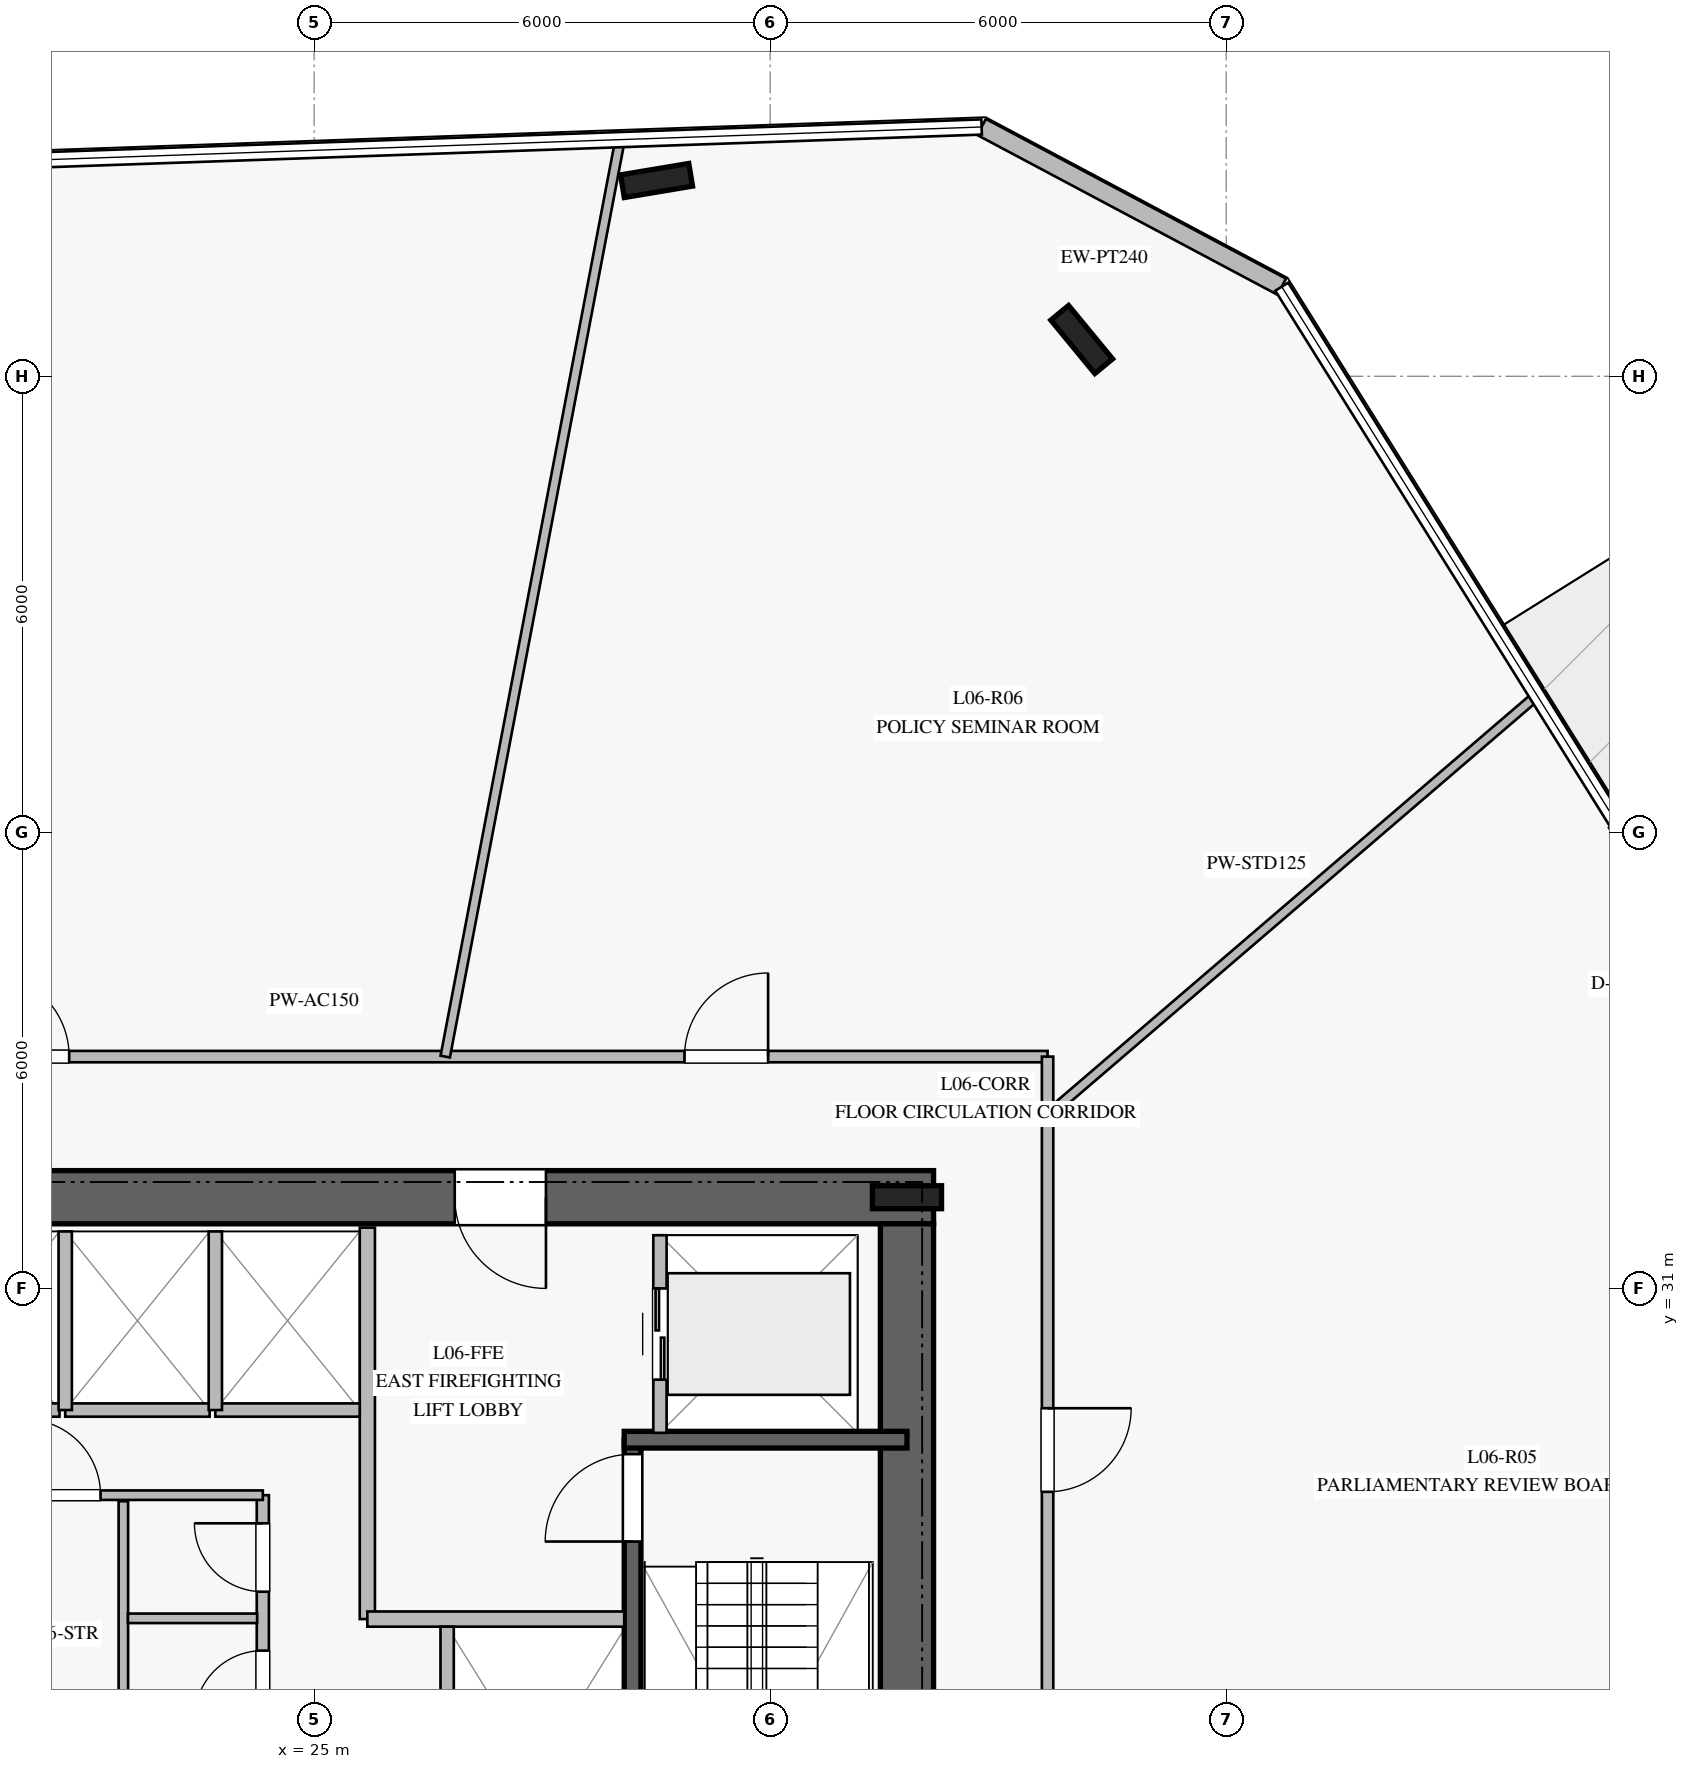
"""IFC4 building model, lengths in metres.
Left out: names, types, materials, properties, quantities, classifications, styles, units other than length and angle.
Written with IfcOpenShell. Run it as: python <this file> out.ifc"""

import sys

from ifc_helpers import new_model, si_unit, direction, frame, frame_2d, origin, origin_2d, place, context, subcontext, project, spatial, rectangle, i_section, extrude, element, fill, save


model = new_model("IFC4")
c1 = context("Model", 3, precision=1e-05, world=origin(), true_north=direction((0.0, 1.0)))
c2 = subcontext(c1, "Body", "Model", "MODEL_VIEW")
j1 = project(units=[si_unit("LENGTHUNIT", "METRE"), si_unit("PLANEANGLEUNIT", "RADIAN")], contexts=[c1])
p1 = place(None, origin())
s1 = spatial("IfcSite", under=j1, at=p1, CompositionType="ELEMENT")
p2 = place(p1, origin())
s2 = spatial("IfcBuilding", under=s1, at=p2, CompositionType="ELEMENT")
p3 = place(p2, frame((0.0, 0.0, 28.0)))
s3 = spatial("IfcBuildingStorey", under=s2, at=p3, CompositionType="ELEMENT", Elevation=28.0)
p4 = place(p3, frame((33.15, 32.2, 0.0), z_axis=(0.0, 0.0, 1.0), x_axis=(-1.0, 0.0, 0.0)))
e1 = element("IfcWall", 1, at=p4, inside=s3, PredefinedType="SHEAR", context=c2, shape_type="SweptSolid", body=[
    extrude(rectangle(XDim=16.3, YDim=0.7, at=frame_2d((8.15, 0.0))), origin(), (0.0, 0.0, 1.0), 3.76),
])
p5 = place(p4, frame((5.1, 0.0, 0.0)))
e2 = element("IfcOpeningElement", 2, at=p5, cuts=e1, PredefinedType="OPENING", context=c2, shape_type="SweptSolid", body=[
    extrude(rectangle(XDim=1.2, YDim=2.25, at=frame_2d((0.6, 1.125))), frame((0.0, 0.36, 0.0), z_axis=(0.0, -1.0, 0.0), x_axis=(1.0, 0.0, 0.0)), (0.0, 0.0, 1.0), 0.72),
])
p6 = place(p3, frame((32.8, 18.15, 0.0), z_axis=(0.0, 0.0, 1.0), x_axis=(0.0, 1.0, 0.0)))
e3 = element("IfcWall", 3, at=p6, inside=s3, PredefinedType="SHEAR", context=c2, shape_type="SweptSolid", body=[
    extrude(rectangle(XDim=13.7, YDim=0.7, at=frame_2d((6.85, 0.0))), origin(), (0.0, 0.0, 1.0), 3.76),
])
p7 = place(p3, frame((32.8, 32.2, 0.0), z_axis=(0.0, 0.0, 1.0), x_axis=(1.0, 0.0, 0.0)))
e4 = element("IfcColumn", 4, at=p7, inside=s3, PredefinedType="COLUMN", context=c2, shape_type="SweptSolid", body=[
    extrude(i_section(OverallWidth=0.302, OverallDepth=0.91, WebThickness=0.021, FlangeThickness=0.04, at=origin_2d()), origin(), (0.0, 0.0, 1.0), 4.0),
])
p8 = place(p3, frame((29.19, 21.79, 0.0), z_axis=(0.0, 0.0, 1.0), x_axis=(0.0, 1.0, 0.0)))
e5 = element("IfcWall", 5, at=p8, inside=s3, PredefinedType="SOLIDWALL", context=c2, shape_type="SweptSolid", body=[
    extrude(rectangle(XDim=7.22, YDim=0.22, at=frame_2d((3.61, 0.0))), origin(), (0.0, 0.0, 1.0), 3.76),
])
p9 = place(p8, frame((5.88, 0.0, 0.0)))
e6 = element("IfcOpeningElement", 6, at=p9, cuts=e5, PredefinedType="OPENING", context=c2, shape_type="SweptSolid", body=[
    extrude(rectangle(XDim=1.15, YDim=2.2, at=frame_2d((0.575, 1.1))), frame((0.0, 0.12, 0.0), z_axis=(0.0, -1.0, 0.0), x_axis=(1.0, 0.0, 0.0)), (0.0, 0.0, 1.0), 0.24),
])
p10 = place(p3, frame((29.08, 29.01, 0.0), z_axis=(0.0, 0.0, 1.0), x_axis=(1.0, 0.0, 0.0)))
e7 = element("IfcWall", 7, at=p10, inside=s3, PredefinedType="SOLIDWALL", context=c2, shape_type="SweptSolid", body=[
    extrude(rectangle(XDim=3.72, YDim=0.22, at=frame_2d((1.86, 0.0))), origin(), (0.0, 0.0, 1.0), 3.76),
])
for number, where, z_axis, x_axis in (
    (8, (35.099, 43.484, 0.0), (0.0, 0.0, 1.0), (-0.636, 0.772, 0.0)),
    (9, (29.505, 45.576, 0.0), (0.0, 0.0, 1.0), (0.986, 0.165, 0.0)),
):
    element("IfcColumn", number, at=place(p3, frame(where, z_axis=z_axis, x_axis=x_axis)), inside=s3, PredefinedType="COLUMN", context=c2, shape_type="SweptSolid", body=[
        extrude(i_section(OverallWidth=0.302, OverallDepth=0.91, WebThickness=0.021, FlangeThickness=0.04, at=origin_2d()), origin(), (0.0, 0.0, 1.0), 4.0),
    ])
p11 = place(p3, frame((43.411, 35.089, 0.0), z_axis=(0.0, 0.0, 1.0), x_axis=(-0.530044663287, 0.847969725239, 0.0)))
e10 = element("IfcWall", 10, at=p11, inside=s3, PredefinedType="STANDARD", context=c2, shape_type="SweptSolid", body=[
    extrude(rectangle(XDim=2.4, YDim=0.24, at=frame_2d((1.2, 0.0))), origin(), (0.0, 0.0, 1.0), 3.76),
])
p12 = place(p11, frame((0.4, 0.0, 0.0)))
e11 = element("IfcOpeningElement", 11, at=p12, cuts=e10, PredefinedType="OPENING", context=c2, shape_type="SweptSolid", body=[
    extrude(rectangle(XDim=1.6, YDim=2.25, at=frame_2d((0.8, 1.125))), frame((0.0, 0.13, 0.0), z_axis=(0.0, -1.0, 0.0), x_axis=(1.0, 0.0, 0.0)), (0.0, 0.0, 1.0), 0.26),
])
p13 = place(p3, frame((37.731, 44.179, 0.0), z_axis=(0.0, 0.0, 1.0), x_axis=(-0.882820866688, 0.469709822486, 0.0)))
e12 = element("IfcWall", 12, at=p13, inside=s3, PredefinedType="STANDARD", context=c2, shape_type="SweptSolid", body=[
    extrude(rectangle(XDim=4.473, YDim=0.24, at=frame_2d((2.237, 0.0))), origin(), (0.0, 0.0, 1.0), 3.76),
])
p14 = place(p3, frame((25.7, 26.65, 0.0), z_axis=(0.0, 0.0, 1.0), x_axis=(0.0, 1.0, 0.0)))
e13 = element("IfcWall", 13, at=p14, inside=s3, PredefinedType="PARTITIONING", context=c2, shape_type="SweptSolid", body=[
    extrude(rectangle(XDim=5.15, YDim=0.2, at=frame_2d((2.575, 0.0))), origin(), (0.0, 0.0, 1.0), 3.76),
])
p15 = place(p3, frame((25.7, 26.65, 0.0), z_axis=(0.0, 0.0, 1.0), x_axis=(1.0, 0.0, 0.0)))
e14 = element("IfcWall", 14, at=p15, inside=s3, PredefinedType="PARTITIONING", context=c2, shape_type="SweptSolid", body=[
    extrude(rectangle(XDim=3.38, YDim=0.2, at=frame_2d((1.69, 0.0))), origin(), (0.0, 0.0, 1.0), 3.76),
])
p16 = place(p3, frame((24.325, 23.35, 0.0), z_axis=(0.0, 0.0, 1.0), x_axis=(0.0, 1.0, 0.0)))
e15 = element("IfcWall", 15, at=p16, inside=s3, PredefinedType="PLUMBINGWALL", context=c2, shape_type="SweptSolid", body=[
    extrude(rectangle(XDim=4.93, YDim=0.16, at=frame_2d((2.465, 0.0))), origin(), (0.0, 0.0, 1.0), 3.76),
])
p17 = place(p16, frame((0.325, 0.0, 0.0)))
e16 = element("IfcOpeningElement", 16, at=p17, cuts=e15, PredefinedType="OPENING", context=c2, shape_type="SweptSolid", body=[
    extrude(rectangle(XDim=0.95, YDim=2.1, at=frame_2d((0.475, 1.05))), frame((0.0, 0.09, 0.0), z_axis=(0.0, -1.0, 0.0), x_axis=(1.0, 0.0, 0.0)), (0.0, 0.0, 1.0), 0.18),
])
p18 = place(p16, frame((1.985, 0.0, 0.0)))
e17 = element("IfcOpeningElement", 17, at=p18, cuts=e15, PredefinedType="OPENING", context=c2, shape_type="SweptSolid", body=[
    extrude(rectangle(XDim=0.9, YDim=2.1, at=frame_2d((0.45, 1.05))), frame((0.0, 0.09, 0.0), z_axis=(0.0, -1.0, 0.0), x_axis=(1.0, 0.0, 0.0)), (0.0, 0.0, 1.0), 0.18),
])
p19 = place(p16, frame((3.66, 0.0, 0.0)))
e18 = element("IfcOpeningElement", 18, at=p19, cuts=e15, PredefinedType="OPENING", context=c2, shape_type="SweptSolid", body=[
    extrude(rectangle(XDim=0.9, YDim=2.1, at=frame_2d((0.45, 1.05))), frame((0.0, 0.09, 0.0), z_axis=(0.0, -1.0, 0.0), x_axis=(1.0, 0.0, 0.0)), (0.0, 0.0, 1.0), 0.18),
])
p20 = place(p3, frame((20.92, 28.28, 0.0), z_axis=(0.0, 0.0, 1.0), x_axis=(1.0, 0.0, 0.0)))
e19 = element("IfcWall", 19, at=p20, inside=s3, PredefinedType="PARTITIONING", context=c2, shape_type="SweptSolid", body=[
    extrude(rectangle(XDim=3.405, YDim=0.125, at=frame_2d((1.703, 0.0))), origin(), (0.0, 0.0, 1.0), 3.76),
])
p21 = place(p20, frame((0.27, 0.0, 0.0)))
e20 = element("IfcOpeningElement", 20, at=p21, cuts=e19, PredefinedType="OPENING", context=c2, shape_type="SweptSolid", body=[
    extrude(rectangle(XDim=1.0, YDim=2.15, at=frame_2d((0.5, 1.075))), frame((0.0, 0.073, 0.0), z_axis=(0.0, -1.0, 0.0), x_axis=(1.0, 0.0, 0.0)), (0.0, 0.0, 1.0), 0.145),
])
p22 = place(p3, frame((22.49, 24.97, 0.0), z_axis=(0.0, 0.0, 1.0), x_axis=(0.0, 1.0, 0.0)))
e21 = element("IfcWall", 21, at=p22, inside=s3, PredefinedType="PARTITIONING", context=c2, shape_type="SweptSolid", body=[
    extrude(rectangle(XDim=3.23, YDim=0.125, at=frame_2d((1.615, 0.0))), origin(), (0.0, 0.0, 1.0), 3.76),
])
p23 = place(p3, frame((22.55, 26.66, 0.0), z_axis=(0.0, 0.0, 1.0), x_axis=(1.0, 0.0, 0.0)))
e22 = element("IfcWall", 22, at=p23, inside=s3, PredefinedType="PARTITIONING", context=c2, shape_type="SweptSolid", body=[
    extrude(rectangle(XDim=1.7, YDim=0.125, at=frame_2d((0.85, 0.0))), origin(), (0.0, 0.0, 1.0), 3.76),
])
for number, where, z_axis, x_axis in (
    (23, (19.75, 29.4, 0.0), (0.0, 0.0, 1.0), (1.0, 0.0, 0.0)),
    (24, (21.725, 29.4, 0.0), (0.0, 0.0, 1.0), (1.0, 0.0, 0.0)),
):
    element("IfcWall", number, at=place(p3, frame(where, z_axis=z_axis, x_axis=x_axis)), inside=s3, PredefinedType="PARTITIONING", context=c2, shape_type="SweptSolid", body=[
        extrude(rectangle(XDim=1.9, YDim=0.175, at=frame_2d((0.95, 0.0))), origin(), (0.0, 0.0, 1.0), 3.76),
    ])
p24 = place(p3, frame((21.725, 29.4, 0.0), z_axis=(0.0, 0.0, 1.0), x_axis=(0.0, 1.0, 0.0)))
e25 = element("IfcWall", 25, at=p24, inside=s3, PredefinedType="PARTITIONING", context=c2, shape_type="SweptSolid", body=[
    extrude(rectangle(XDim=2.35, YDim=0.175, at=frame_2d((1.175, 0.0))), origin(), (0.0, 0.0, 1.0), 3.76),
])
p25 = place(p3, frame((23.7, 29.4, 0.0), z_axis=(0.0, 0.0, 1.0), x_axis=(1.0, 0.0, 0.0)))
e26 = element("IfcWall", 26, at=p25, inside=s3, PredefinedType="PARTITIONING", context=c2, shape_type="SweptSolid", body=[
    extrude(rectangle(XDim=1.9, YDim=0.175, at=frame_2d((0.95, 0.0))), origin(), (0.0, 0.0, 1.0), 3.76),
])
p26 = place(p3, frame((23.7, 29.4, 0.0), z_axis=(0.0, 0.0, 1.0), x_axis=(0.0, 1.0, 0.0)))
e27 = element("IfcWall", 27, at=p26, inside=s3, PredefinedType="PARTITIONING", context=c2, shape_type="SweptSolid", body=[
    extrude(rectangle(XDim=2.35, YDim=0.175, at=frame_2d((1.175, 0.0))), origin(), (0.0, 0.0, 1.0), 3.76),
])
p27 = place(p3, frame((26.75, 24.65, 0.0), z_axis=(0.0, 0.0, 1.0), x_axis=(0.0, 1.0, 0.0)))
e28 = element("IfcWall", 28, at=p27, inside=s3, PredefinedType="PARTITIONING", context=c2, shape_type="SweptSolid", body=[
    extrude(rectangle(XDim=1.9, YDim=0.175, at=frame_2d((0.95, 0.0))), origin(), (0.0, 0.0, 1.0), 3.76),
])
p28 = place(p3, frame((29.55, 29.1, 0.0), z_axis=(0.0, 0.0, 1.0), x_axis=(0.0, 1.0, 0.0)))
e29 = element("IfcWall", 29, at=p28, inside=s3, PredefinedType="PARTITIONING", context=c2, shape_type="SweptSolid", body=[
    extrude(rectangle(XDim=2.6, YDim=0.175, at=frame_2d((1.3, 0.0))), origin(), (0.0, 0.0, 1.0), 3.76),
])
p29 = place(p28, frame((0.7, 0.0, 0.0)))
e30 = element("IfcOpeningElement", 30, at=p29, cuts=e29, PredefinedType="OPENING", context=c2, shape_type="SweptSolid", body=[
    extrude(rectangle(XDim=1.2, YDim=2.2, at=frame_2d((0.6, 1.1))), frame((0.0, 0.098, 0.0), z_axis=(0.0, -1.0, 0.0), x_axis=(1.0, 0.0, 0.0)), (0.0, 0.0, 1.0), 0.195),
])
p30 = place(p3, frame((15.35, 34.05, 0.0), z_axis=(0.0, 0.0, 1.0), x_axis=(1.0, 0.0, 0.0)))
e31 = element("IfcWall", 31, at=p30, inside=s3, PredefinedType="PARTITIONING", context=c2, shape_type="SweptSolid", body=[
    extrude(rectangle(XDim=19.3, YDim=0.15, at=frame_2d((9.65, 0.0))), origin(), (0.0, 0.0, 1.0), 3.21),
])
p31 = place(p30, frame((14.523, 0.0, 0.0)))
e32 = element("IfcOpeningElement", 32, at=p31, cuts=e31, PredefinedType="OPENING", context=c2, shape_type="SweptSolid", body=[
    extrude(rectangle(XDim=1.1, YDim=2.2, at=frame_2d((0.55, 1.1))), frame((0.0, 0.085, 0.0), z_axis=(0.0, -1.0, 0.0), x_axis=(1.0, 0.0, 0.0)), (0.0, 0.0, 1.0), 0.17),
])
p32 = place(p30, frame((5.327, 0.0, 0.0)))
e33 = element("IfcOpeningElement", 33, at=p32, cuts=e31, PredefinedType="OPENING", context=c2, shape_type="SweptSolid", body=[
    extrude(rectangle(XDim=1.1, YDim=2.2, at=frame_2d((0.55, 1.1))), frame((0.0, 0.085, 0.0), z_axis=(0.0, -1.0, 0.0), x_axis=(1.0, 0.0, 0.0)), (0.0, 0.0, 1.0), 0.17),
])
p33 = place(p3, frame((34.65, 34.05, 0.0), z_axis=(0.0, 0.0, 1.0), x_axis=(0.0, -1.0, 0.0)))
e34 = element("IfcWall", 34, at=p33, inside=s3, PredefinedType="PARTITIONING", context=c2, shape_type="SweptSolid", body=[
    extrude(rectangle(XDim=18.1, YDim=0.15, at=frame_2d((9.05, 0.0))), origin(), (0.0, 0.0, 1.0), 3.21),
])
p34 = place(p33, frame((13.006, 0.0, 0.0)))
e35 = element("IfcOpeningElement", 35, at=p34, cuts=e34, PredefinedType="OPENING", context=c2, shape_type="SweptSolid", body=[
    extrude(rectangle(XDim=1.1, YDim=2.2, at=frame_2d((0.55, 1.1))), frame((0.0, 0.085, 0.0), z_axis=(0.0, -1.0, 0.0), x_axis=(1.0, 0.0, 0.0)), (0.0, 0.0, 1.0), 0.17),
])
p35 = place(p33, frame((4.626, 0.0, 0.0)))
e36 = element("IfcOpeningElement", 36, at=p35, cuts=e34, PredefinedType="OPENING", context=c2, shape_type="SweptSolid", body=[
    extrude(rectangle(XDim=1.1, YDim=2.2, at=frame_2d((0.55, 1.1))), frame((0.0, 0.085, 0.0), z_axis=(0.0, -1.0, 0.0), x_axis=(1.0, 0.0, 0.0)), (0.0, 0.0, 1.0), 0.17),
])
p36 = place(p3, frame((34.65, 33.278, 0.0), z_axis=(0.0, 0.0, 1.0), x_axis=(0.758961436241, 0.651135575974, 0.0)))
e37 = element("IfcWall", 37, at=p36, inside=s3, PredefinedType="PARTITIONING", context=c2, shape_type="SweptSolid", body=[
    extrude(rectangle(XDim=8.468, YDim=0.125, at=frame_2d((4.234, 0.0))), origin(), (0.0, 0.0, 1.0), 3.05),
])
p37 = place(p3, frame((26.725, 34.05, 0.0), z_axis=(0.0, 0.0, 1.0), x_axis=(0.187302392837, 0.982302302572, 0.0)))
e38 = element("IfcWall", 38, at=p37, inside=s3, PredefinedType="PARTITIONING", context=c2, shape_type="SweptSolid", body=[
    extrude(rectangle(XDim=12.263, YDim=0.125, at=frame_2d((6.131, 0.0))), origin(), (0.0, 0.0, 1.0), 3.06),
])
p38 = place(p9, origin())
e39 = element("IfcDoor", 39, at=p38, inside=s3, OperationType="SINGLE_SWING_LEFT", PredefinedType="DOOR", context=c2, shape_type="SweptSolid", body=[
    extrude(rectangle(XDim=1.15, YDim=2.2, at=frame_2d((0.575, 1.1))), frame((0.0, 0.025, 0.0), z_axis=(0.0, -1.0, 0.0), x_axis=(1.0, 0.0, 0.0)), (0.0, 0.0, 1.0), 0.05),
])
fill(e6, e39)
p39 = place(p5, origin())
e40 = element("IfcDoor", 40, at=p39, inside=s3, OperationType="SINGLE_SWING_LEFT", PredefinedType="DOOR", context=c2, shape_type="SweptSolid", body=[
    extrude(rectangle(XDim=1.2, YDim=2.25, at=frame_2d((0.6, 1.125))), frame((0.0, 0.025, 0.0), z_axis=(0.0, -1.0, 0.0), x_axis=(1.0, 0.0, 0.0)), (0.0, 0.0, 1.0), 0.05),
])
fill(e2, e40)
p40 = place(p18, origin())
e41 = element("IfcDoor", 41, at=p40, inside=s3, OperationType="SINGLE_SWING_LEFT", PredefinedType="DOOR", context=c2, shape_type="SweptSolid", body=[
    extrude(rectangle(XDim=0.9, YDim=2.1, at=frame_2d((0.45, 1.05))), frame((0.0, 0.025, 0.0), z_axis=(0.0, -1.0, 0.0), x_axis=(1.0, 0.0, 0.0)), (0.0, 0.0, 1.0), 0.05),
])
fill(e17, e41)
p41 = place(p19, origin())
e42 = element("IfcDoor", 42, at=p41, inside=s3, OperationType="SINGLE_SWING_RIGHT", PredefinedType="DOOR", context=c2, shape_type="SweptSolid", body=[
    extrude(rectangle(XDim=0.9, YDim=2.1, at=frame_2d((0.45, 1.05))), frame((0.0, 0.025, 0.0), z_axis=(0.0, -1.0, 0.0), x_axis=(1.0, 0.0, 0.0)), (0.0, 0.0, 1.0), 0.05),
])
fill(e18, e42)
p42 = place(p21, origin())
e43 = element("IfcDoor", 43, at=p42, inside=s3, OperationType="SINGLE_SWING_LEFT", PredefinedType="DOOR", context=c2, shape_type="SweptSolid", body=[
    extrude(rectangle(XDim=1.0, YDim=2.15, at=frame_2d((0.5, 1.075))), frame((0.0, 0.025, 0.0), z_axis=(0.0, -1.0, 0.0), x_axis=(1.0, 0.0, 0.0)), (0.0, 0.0, 1.0), 0.05),
])
fill(e20, e43)
p43 = place(p29, origin())
e44 = element("IfcDoor", 44, at=p43, inside=s3, OperationType="DOUBLE_DOOR_SLIDING", PredefinedType="DOOR", context=c2, shape_type="SweptSolid", body=[
    extrude(rectangle(XDim=1.2, YDim=2.2, at=frame_2d((0.6, 1.1))), frame((0.0, 0.025, 0.0), z_axis=(0.0, -1.0, 0.0), x_axis=(1.0, 0.0, 0.0)), (0.0, 0.0, 1.0), 0.05),
])
fill(e30, e44)
p44 = place(p35, origin())
e45 = element("IfcDoor", 45, at=p44, inside=s3, OperationType="SINGLE_SWING_LEFT", PredefinedType="DOOR", context=c2, shape_type="SweptSolid", body=[
    extrude(rectangle(XDim=1.1, YDim=2.2, at=frame_2d((0.55, 1.1))), frame((0.0, 0.025, 0.0), z_axis=(0.0, -1.0, 0.0), x_axis=(1.0, 0.0, 0.0)), (0.0, 0.0, 1.0), 0.05),
])
fill(e36, e45)
p45 = place(p31, origin())
e46 = element("IfcDoor", 46, at=p45, inside=s3, OperationType="SINGLE_SWING_RIGHT", PredefinedType="DOOR", context=c2, shape_type="SweptSolid", body=[
    extrude(rectangle(XDim=1.1, YDim=2.2, at=frame_2d((0.55, 1.1))), frame((0.0, 0.025, 0.0), z_axis=(0.0, -1.0, 0.0), x_axis=(1.0, 0.0, 0.0)), (0.0, 0.0, 1.0), 0.05),
])
fill(e32, e46)
p46 = place(p32, origin())
e47 = element("IfcDoor", 47, at=p46, inside=s3, OperationType="SINGLE_SWING_LEFT", PredefinedType="DOOR", context=c2, shape_type="SweptSolid", body=[
    extrude(rectangle(XDim=1.1, YDim=2.2, at=frame_2d((0.55, 1.1))), frame((0.0, 0.025, 0.0), z_axis=(0.0, -1.0, 0.0), x_axis=(1.0, 0.0, 0.0)), (0.0, 0.0, 1.0), 0.05),
])
fill(e33, e47)
save(model, sys.argv[1])
